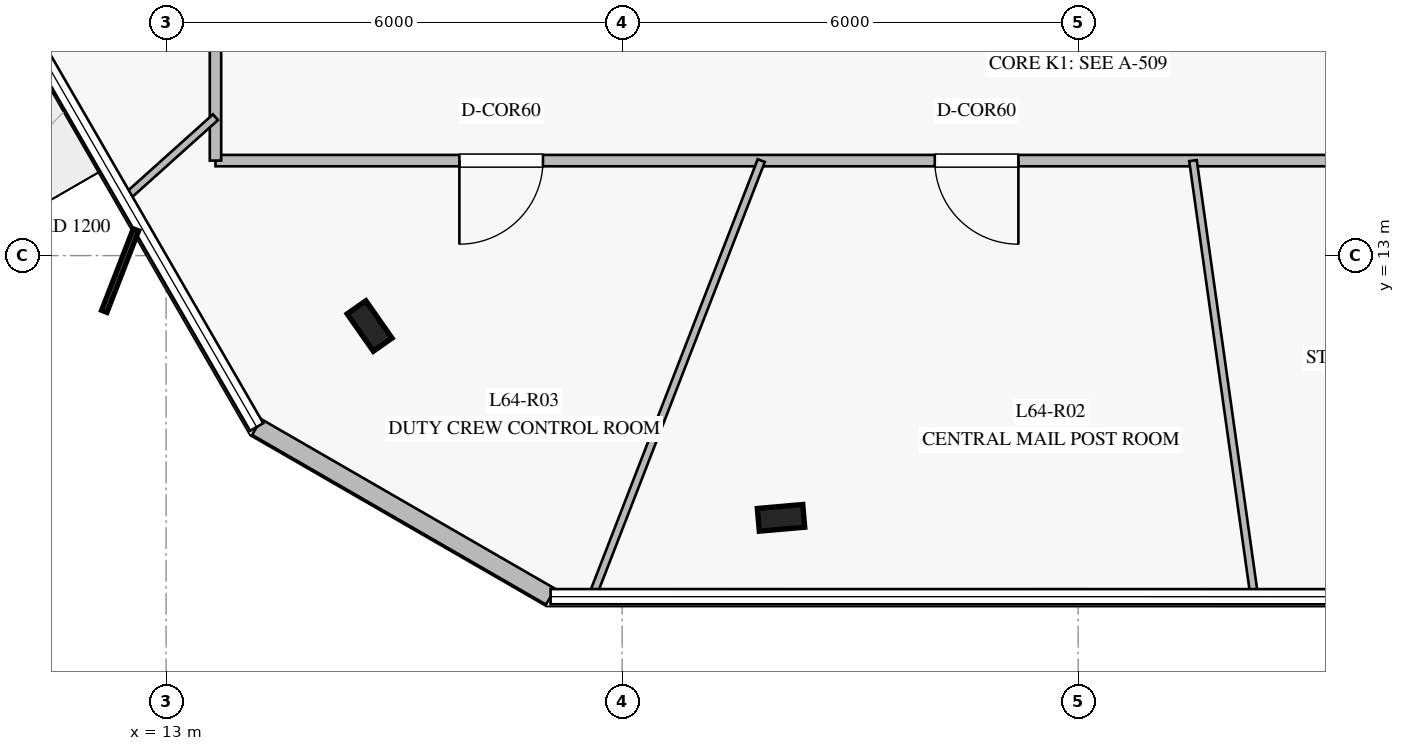
"""IFC4 building model, lengths in metres.
Left out: names, types, materials, properties, quantities, classifications, styles, units other than length and angle.
Written with IfcOpenShell. Run it as: python <this file> out.ifc"""

import sys

from ifc_helpers import new_model, si_unit, direction, frame, frame_2d, origin, origin_2d, place, context, subcontext, project, spatial, rectangle, i_section, extrude, element, fill, save


model = new_model("IFC4")
c1 = context("Model", 3, precision=1e-05, world=origin(), true_north=direction((0.0, 1.0)))
c2 = subcontext(c1, "Body", "Model", "MODEL_VIEW")
j1 = project(units=[si_unit("LENGTHUNIT", "METRE"), si_unit("PLANEANGLEUNIT", "RADIAN")], contexts=[c1])
p1 = place(None, origin())
s1 = spatial("IfcSite", under=j1, at=p1, CompositionType="ELEMENT")
p2 = place(p1, origin())
s2 = spatial("IfcBuilding", under=s1, at=p2, CompositionType="ELEMENT")
p3 = place(p2, frame((0.0, 0.0, 266.2)))
s3 = spatial("IfcBuildingStorey", under=s2, at=p3, CompositionType="ELEMENT", Elevation=266.2)
for number, where, z_axis, x_axis in (
    (1, (15.678, 12.074, 0.0), (0.0, 0.0, 1.0), (-0.574, 0.819, 0.0)),
    (2, (21.091, 9.55, 0.0), (0.0, 0.0, 1.0), (0.996, 0.087, 0.0)),
):
    element("IfcColumn", number, at=place(p3, frame(where, z_axis=z_axis, x_axis=x_axis)), inside=s3, PredefinedType="COLUMN", context=c2, shape_type="SweptSolid", body=[
        extrude(i_section(OverallWidth=0.3, OverallDepth=0.6, WebThickness=0.015, FlangeThickness=0.03, at=origin_2d()), origin(), (0.0, 0.0, 1.0), 4.0),
    ])
p4 = place(p3, frame((14.192, 10.745, 0.0), z_axis=(0.0, 0.0, 1.0), x_axis=(0.866078154638, -0.499908621708, 0.0)))
e3 = element("IfcWall", 3, at=p4, inside=s3, PredefinedType="STANDARD", context=c2, shape_type="SweptSolid", body=[
    extrude(rectangle(XDim=4.465, YDim=0.24, at=frame_2d((2.232, 0.0))), origin(), (0.0, 0.0, 1.0), 3.78),
])
p5 = place(p3, frame((36.35, 14.25, 0.0), z_axis=(0.0, 0.0, 1.0), x_axis=(-1.0, 0.0, 0.0)))
e4 = element("IfcWall", 4, at=p5, inside=s3, PredefinedType="PARTITIONING", context=c2, shape_type="SweptSolid", body=[
    extrude(rectangle(XDim=22.7, YDim=0.15, at=frame_2d((11.35, 0.0))), origin(), (0.0, 0.0, 1.0), 2.43),
])
p6 = place(p5, frame((12.136, 0.0, 0.0)))
e5 = element("IfcOpeningElement", 5, at=p6, cuts=e4, PredefinedType="OPENING", context=c2, shape_type="SweptSolid", body=[
    extrude(rectangle(XDim=1.1, YDim=2.2, at=frame_2d((0.55, 1.1))), frame((0.0, 0.085, 0.0), z_axis=(0.0, -1.0, 0.0), x_axis=(1.0, 0.0, 0.0)), (0.0, 0.0, 1.0), 0.17),
])
p7 = place(p5, frame((18.391, 0.0, 0.0)))
e6 = element("IfcOpeningElement", 6, at=p7, cuts=e4, PredefinedType="OPENING", context=c2, shape_type="SweptSolid", body=[
    extrude(rectangle(XDim=1.1, YDim=2.2, at=frame_2d((0.55, 1.1))), frame((0.0, 0.085, 0.0), z_axis=(0.0, -1.0, 0.0), x_axis=(1.0, 0.0, 0.0)), (0.0, 0.0, 1.0), 0.17),
])
p8 = place(p3, frame((13.65, 14.25, 0.0), z_axis=(0.0, 0.0, 1.0), x_axis=(0.0, 1.0, 0.0)))
e7 = element("IfcWall", 7, at=p8, inside=s3, PredefinedType="PARTITIONING", context=c2, shape_type="SweptSolid", body=[
    extrude(rectangle(XDim=21.5, YDim=0.15, at=frame_2d((10.75, 0.0))), origin(), (0.0, 0.0, 1.0), 3.28),
])
p9 = place(p8, frame((6.935, 0.0, 0.0)))
e8 = element("IfcOpeningElement", 8, at=p9, cuts=e7, PredefinedType="OPENING", context=c2, shape_type="SweptSolid", body=[
    extrude(rectangle(XDim=1.1, YDim=2.2, at=frame_2d((0.55, 1.1))), frame((0.0, 0.085, 0.0), z_axis=(0.0, -1.0, 0.0), x_axis=(1.0, 0.0, 0.0)), (0.0, 0.0, 1.0), 0.17),
])
p10 = place(p3, frame((13.65, 14.821, 0.0), z_axis=(0.0, 0.0, 1.0), x_axis=(-0.744157958849, -0.668003691818, 0.0)))
e9 = element("IfcWall", 9, at=p10, inside=s3, PredefinedType="MOVABLE", context=c2, shape_type="SweptSolid", body=[
    extrude(rectangle(XDim=1.587, YDim=0.1, at=frame_2d((0.793, 0.0))), origin(), (0.0, 0.0, 1.0), 3.28),
])
p11 = place(p3, frame((26.511, 14.25, 0.0), z_axis=(0.0, 0.0, 1.0), x_axis=(0.139303384613, -0.990249749828, 0.0)))
e10 = element("IfcWall", 10, at=p11, inside=s3, PredefinedType="MOVABLE", context=c2, shape_type="SweptSolid", body=[
    extrude(rectangle(XDim=5.778, YDim=0.1, at=frame_2d((2.889, 0.0))), origin(), (0.0, 0.0, 1.0), 3.05),
])
p12 = place(p3, frame((20.831, 14.25, 0.0), z_axis=(0.0, 0.0, 1.0), x_axis=(-0.361622436368, -0.932324628826, 0.0)))
e11 = element("IfcWall", 11, at=p12, inside=s3, PredefinedType="MOVABLE", context=c2, shape_type="SweptSolid", body=[
    extrude(rectangle(XDim=6.136, YDim=0.1, at=frame_2d((3.068, 0.0))), origin(), (0.0, 0.0, 1.0), 3.05),
])
p13 = place(p6, origin())
e12 = element("IfcDoor", 12, at=p13, inside=s3, OperationType="SINGLE_SWING_LEFT", PredefinedType="DOOR", context=c2, shape_type="SweptSolid", body=[
    extrude(rectangle(XDim=1.1, YDim=2.2, at=frame_2d((0.55, 1.1))), frame((0.0, 0.025, 0.0), z_axis=(0.0, -1.0, 0.0), x_axis=(1.0, 0.0, 0.0)), (0.0, 0.0, 1.0), 0.05),
])
fill(e5, e12)
p14 = place(p7, origin())
e13 = element("IfcDoor", 13, at=p14, inside=s3, OperationType="SINGLE_SWING_RIGHT", PredefinedType="DOOR", context=c2, shape_type="SweptSolid", body=[
    extrude(rectangle(XDim=1.1, YDim=2.2, at=frame_2d((0.55, 1.1))), frame((0.0, 0.025, 0.0), z_axis=(0.0, -1.0, 0.0), x_axis=(1.0, 0.0, 0.0)), (0.0, 0.0, 1.0), 0.05),
])
fill(e6, e13)
save(model, sys.argv[1])
